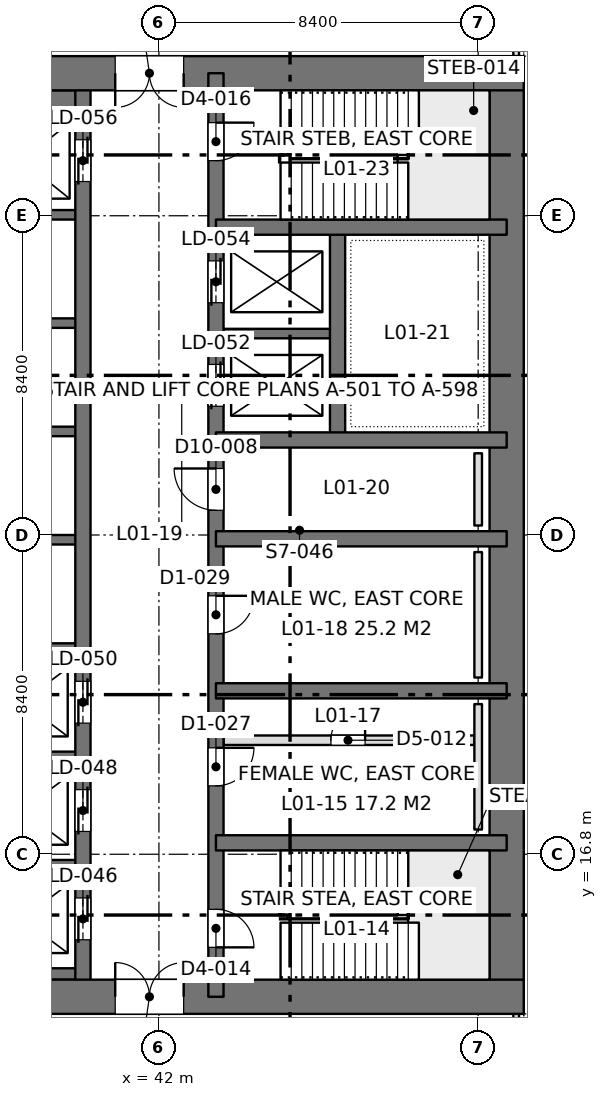
"""IFC4 building model, lengths in metres.
Left out: names, types, materials, properties, quantities, classifications, styles, units other than length and angle.
Written with IfcOpenShell. Run it as: python <this file> out.ifc"""

import sys

from ifc_helpers import new_model, si_unit, direction, frame, frame_2d, origin, place, context, subcontext, project, spatial, rectangle, extrude, element, fill, save


model = new_model("IFC4")
c1 = context("Model", 3, precision=1e-05, world=origin(), true_north=direction((0.0, 1.0)))
c2 = subcontext(c1, "Body", "Model", "MODEL_VIEW")
j1 = project(units=[si_unit("LENGTHUNIT", "METRE"), si_unit("PLANEANGLEUNIT", "RADIAN")], contexts=[c1])
p1 = place(None, origin())
s1 = spatial("IfcSite", under=j1, at=p1, CompositionType="ELEMENT")
p2 = place(p1, origin())
s2 = spatial("IfcBuilding", under=s1, at=p2, CompositionType="ELEMENT")
p3 = place(p2, frame((0.0, 0.0, 5.4)))
s3 = spatial("IfcBuildingStorey", under=s2, at=p3, CompositionType="ELEMENT", Elevation=5.4)
p4 = place(p3, frame((33.6, 13.05, 0.0), z_axis=(0.0, 0.0, 1.0), x_axis=(1.0, 0.0, 0.0)))
e1 = element("IfcWall", 1, at=p4, inside=s3, PredefinedType="SHEAR", context=c2, shape_type="SweptSolid", body=[
    extrude(rectangle(XDim=18.0, YDim=0.9, at=frame_2d((9.0, 0.0))), origin(), (0.0, 0.0, 1.0), 4.5),
])
p5 = place(p4, frame((7.25, 0.0, 0.0)))
e2 = element("IfcOpeningElement", 2, at=p5, cuts=e1, PredefinedType="OPENING", context=c2, shape_type="SweptSolid", body=[
    extrude(rectangle(XDim=1.8, YDim=2.4, at=frame_2d((0.9, 1.2))), frame((0.0, 0.46, 0.0), z_axis=(0.0, -1.0, 0.0), x_axis=(1.0, 0.0, 0.0)), (0.0, 0.0, 1.0), 0.92),
])
p6 = place(p3, frame((33.6, 37.35, 0.0), z_axis=(0.0, 0.0, 1.0), x_axis=(1.0, 0.0, 0.0)))
e3 = element("IfcWall", 3, at=p6, inside=s3, PredefinedType="SHEAR", context=c2, shape_type="SweptSolid", body=[
    extrude(rectangle(XDim=18.0, YDim=0.9, at=frame_2d((9.0, 0.0))), origin(), (0.0, 0.0, 1.0), 4.5),
])
p7 = place(p6, frame((7.25, 0.0, 0.0)))
e4 = element("IfcOpeningElement", 4, at=p7, cuts=e3, PredefinedType="OPENING", context=c2, shape_type="SweptSolid", body=[
    extrude(rectangle(XDim=1.8, YDim=2.4, at=frame_2d((0.9, 1.2))), frame((0.0, 0.46, 0.0), z_axis=(0.0, -1.0, 0.0), x_axis=(1.0, 0.0, 0.0)), (0.0, 0.0, 1.0), 0.92),
])
p8 = place(p3, frame((51.15, 13.05, 0.0), z_axis=(0.0, 0.0, 1.0), x_axis=(0.0, 1.0, 0.0)))
e5 = element("IfcWall", 5, at=p8, inside=s3, PredefinedType="SHEAR", context=c2, shape_type="SweptSolid", body=[
    extrude(rectangle(XDim=24.3, YDim=0.9, at=frame_2d((12.15, 0.0))), origin(), (0.0, 0.0, 1.0), 4.5),
])
p9 = place(p3, frame((43.5, 13.05, 0.0), z_axis=(0.0, 0.0, 1.0), x_axis=(0.0, 1.0, 0.0)))
e6 = element("IfcWall", 6, at=p9, inside=s3, PredefinedType="SHEAR", context=c2, shape_type="SweptSolid", body=[
    extrude(rectangle(XDim=24.3, YDim=0.4, at=frame_2d((12.15, 0.0))), origin(), (0.0, 0.0, 1.0), 4.5),
])
p10 = place(p9, frame((1.3, 0.0, 0.0)))
e7 = element("IfcOpeningElement", 7, at=p10, cuts=e6, PredefinedType="OPENING", context=c2, shape_type="SweptSolid", body=[
    extrude(rectangle(XDim=1.0, YDim=2.2, at=frame_2d((0.5, 1.1))), frame((0.0, 0.21, 0.0), z_axis=(0.0, -1.0, 0.0), x_axis=(1.0, 0.0, 0.0)), (0.0, 0.0, 1.0), 0.42),
])
p11 = place(p9, frame((22.0, 0.0, 0.0)))
e8 = element("IfcOpeningElement", 8, at=p11, cuts=e6, PredefinedType="OPENING", context=c2, shape_type="SweptSolid", body=[
    extrude(rectangle(XDim=1.0, YDim=2.2, at=frame_2d((0.5, 1.1))), frame((0.0, 0.21, 0.0), z_axis=(0.0, -1.0, 0.0), x_axis=(1.0, 0.0, 0.0)), (0.0, 0.0, 1.0), 0.42),
])
p12 = place(p9, frame((5.55, 0.0, 0.0)))
e9 = element("IfcOpeningElement", 9, at=p12, cuts=e6, PredefinedType="OPENING", context=c2, shape_type="SweptSolid", body=[
    extrude(rectangle(XDim=1.0, YDim=2.2, at=frame_2d((0.5, 1.1))), frame((0.0, 0.21, 0.0), z_axis=(0.0, -1.0, 0.0), x_axis=(1.0, 0.0, 0.0)), (0.0, 0.0, 1.0), 0.42),
])
p13 = place(p9, frame((9.55, 0.0, 0.0)))
e10 = element("IfcOpeningElement", 10, at=p13, cuts=e6, PredefinedType="OPENING", context=c2, shape_type="SweptSolid", body=[
    extrude(rectangle(XDim=1.0, YDim=2.2, at=frame_2d((0.5, 1.1))), frame((0.0, 0.21, 0.0), z_axis=(0.0, -1.0, 0.0), x_axis=(1.0, 0.0, 0.0)), (0.0, 0.0, 1.0), 0.42),
])
p14 = place(p9, frame((12.8, 0.0, 0.0)))
e11 = element("IfcOpeningElement", 11, at=p14, cuts=e6, PredefinedType="OPENING", context=c2, shape_type="SweptSolid", body=[
    extrude(rectangle(XDim=1.1, YDim=2.2, at=frame_2d((0.55, 1.1))), frame((0.0, 0.21, 0.0), z_axis=(0.0, -1.0, 0.0), x_axis=(1.0, 0.0, 0.0)), (0.0, 0.0, 1.0), 0.42),
])
p15 = place(p9, frame((15.538, 0.0, 0.0)))
e12 = element("IfcOpeningElement", 12, at=p15, cuts=e6, PredefinedType="OPENING", context=c2, shape_type="SweptSolid", body=[
    extrude(rectangle(XDim=1.1, YDim=2.2, at=frame_2d((0.55, 1.1))), frame((0.0, 0.21, 0.0), z_axis=(0.0, -1.0, 0.0), x_axis=(1.0, 0.0, 0.0)), (0.0, 0.0, 1.0), 0.42),
])
p16 = place(p9, frame((18.262, 0.0, 0.0)))
e13 = element("IfcOpeningElement", 13, at=p16, cuts=e6, PredefinedType="OPENING", context=c2, shape_type="SweptSolid", body=[
    extrude(rectangle(XDim=1.1, YDim=2.2, at=frame_2d((0.55, 1.1))), frame((0.0, 0.21, 0.0), z_axis=(0.0, -1.0, 0.0), x_axis=(1.0, 0.0, 0.0)), (0.0, 0.0, 1.0), 0.42),
])
p17 = place(p3, frame((40.0, 13.05, 0.0), z_axis=(0.0, 0.0, 1.0), x_axis=(0.0, 1.0, 0.0)))
e14 = element("IfcWall", 14, at=p17, inside=s3, PredefinedType="SHEAR", context=c2, shape_type="SweptSolid", body=[
    extrude(rectangle(XDim=24.3, YDim=0.4, at=frame_2d((12.15, 0.0))), origin(), (0.0, 0.0, 1.0), 4.5),
])
p18 = place(p17, frame((1.5, 0.0, 0.0)))
e15 = element("IfcOpeningElement", 15, at=p18, cuts=e14, PredefinedType="OPENING", context=c2, shape_type="SweptSolid", body=[
    extrude(rectangle(XDim=1.1, YDim=2.2, at=frame_2d((0.55, 1.1))), frame((0.0, 0.21, 0.0), z_axis=(0.0, -1.0, 0.0), x_axis=(1.0, 0.0, 0.0)), (0.0, 0.0, 1.0), 0.42),
])
p19 = place(p17, frame((4.35, 0.0, 0.0)))
e16 = element("IfcOpeningElement", 16, at=p19, cuts=e14, PredefinedType="OPENING", context=c2, shape_type="SweptSolid", body=[
    extrude(rectangle(XDim=1.1, YDim=2.2, at=frame_2d((0.55, 1.1))), frame((0.0, 0.21, 0.0), z_axis=(0.0, -1.0, 0.0), x_axis=(1.0, 0.0, 0.0)), (0.0, 0.0, 1.0), 0.42),
])
p20 = place(p17, frame((7.2, 0.0, 0.0)))
e17 = element("IfcOpeningElement", 17, at=p20, cuts=e14, PredefinedType="OPENING", context=c2, shape_type="SweptSolid", body=[
    extrude(rectangle(XDim=1.1, YDim=2.2, at=frame_2d((0.55, 1.1))), frame((0.0, 0.21, 0.0), z_axis=(0.0, -1.0, 0.0), x_axis=(1.0, 0.0, 0.0)), (0.0, 0.0, 1.0), 0.42),
])
p21 = place(p17, frame((21.45, 0.0, 0.0)))
e18 = element("IfcOpeningElement", 18, at=p21, cuts=e14, PredefinedType="OPENING", context=c2, shape_type="SweptSolid", body=[
    extrude(rectangle(XDim=1.1, YDim=2.2, at=frame_2d((0.55, 1.1))), frame((0.0, 0.21, 0.0), z_axis=(0.0, -1.0, 0.0), x_axis=(1.0, 0.0, 0.0)), (0.0, 0.0, 1.0), 0.42),
])
for number, where, z_axis, x_axis in (
    (19, (51.15, 17.1, 0.0), (0.0, 0.0, 1.0), (-1.0, 0.0, 0.0)),
    (20, (51.15, 21.1, 0.0), (0.0, 0.0, 1.0), (-1.0, 0.0, 0.0)),
    (21, (51.15, 25.1, 0.0), (0.0, 0.0, 1.0), (-1.0, 0.0, 0.0)),
    (22, (51.15, 27.7, 0.0), (0.0, 0.0, 1.0), (-1.0, 0.0, 0.0)),
    (23, (51.15, 33.3, 0.0), (0.0, 0.0, 1.0), (-1.0, 0.0, 0.0)),
):
    element("IfcWall", number, at=place(p3, frame(where, z_axis=z_axis, x_axis=x_axis)), inside=s3, PredefinedType="SHEAR", context=c2, shape_type="SweptSolid", body=[
        extrude(rectangle(XDim=7.65, YDim=0.4, at=frame_2d((3.825, 0.0))), origin(), (0.0, 0.0, 1.0), 4.5),
    ])
p22 = place(p3, frame((46.7, 27.7, 0.0), z_axis=(0.0, 0.0, 1.0), x_axis=(0.0, 1.0, 0.0)))
e24 = element("IfcWall", 24, at=p22, inside=s3, PredefinedType="SHEAR", context=c2, shape_type="SweptSolid", body=[
    extrude(rectangle(XDim=5.6, YDim=0.4, at=frame_2d((2.8, 0.0))), origin(), (0.0, 0.0, 1.0), 4.5),
])
p23 = place(p3, frame((46.7, 30.5, 0.0), z_axis=(0.0, 0.0, 1.0), x_axis=(-1.0, 0.0, 0.0)))
e25 = element("IfcWall", 25, at=p23, inside=s3, PredefinedType="SHEAR", context=c2, shape_type="SweptSolid", body=[
    extrude(rectangle(XDim=3.2, YDim=0.25, at=frame_2d((1.6, 0.0))), origin(), (0.0, 0.0, 1.0), 4.5),
])
p24 = place(p3, frame((40.0, 13.65, 0.0), z_axis=(0.0, 0.0, 1.0), x_axis=(-1.0, 0.0, 0.0)))
e26 = element("IfcWall", 26, at=p24, inside=s3, PredefinedType="SHEAR", context=c2, shape_type="SweptSolid", body=[
    extrude(rectangle(XDim=3.2, YDim=0.3, at=frame_2d((1.6, 0.0))), origin(), (0.0, 0.0, 1.0), 4.5),
])
for number, where, z_axis, x_axis in (
    (27, (40.0, 16.525, 0.0), (0.0, 0.0, 1.0), (-1.0, 0.0, 0.0)),
    (28, (40.0, 19.375, 0.0), (0.0, 0.0, 1.0), (-1.0, 0.0, 0.0)),
    (29, (40.0, 22.225, 0.0), (0.0, 0.0, 1.0), (-1.0, 0.0, 0.0)),
    (30, (40.0, 25.075, 0.0), (0.0, 0.0, 1.0), (-1.0, 0.0, 0.0)),
    (31, (40.0, 27.925, 0.0), (0.0, 0.0, 1.0), (-1.0, 0.0, 0.0)),
    (32, (40.0, 30.775, 0.0), (0.0, 0.0, 1.0), (-1.0, 0.0, 0.0)),
    (33, (40.0, 33.625, 0.0), (0.0, 0.0, 1.0), (-1.0, 0.0, 0.0)),
):
    element("IfcWall", number, at=place(p3, frame(where, z_axis=z_axis, x_axis=x_axis)), inside=s3, PredefinedType="SHEAR", context=c2, shape_type="SweptSolid", body=[
        extrude(rectangle(XDim=3.2, YDim=0.25, at=frame_2d((1.6, 0.0))), origin(), (0.0, 0.0, 1.0), 4.5),
    ])
p25 = place(p3, frame((40.0, 36.625, 0.0), z_axis=(0.0, 0.0, 1.0), x_axis=(-1.0, 0.0, 0.0)))
e34 = element("IfcWall", 34, at=p25, inside=s3, PredefinedType="SHEAR", context=c2, shape_type="SweptSolid", body=[
    extrude(rectangle(XDim=3.2, YDim=0.55, at=frame_2d((1.6, 0.0))), origin(), (0.0, 0.0, 1.0), 4.5),
])
p26 = place(p3, frame((51.4, 6.12, 0.0), z_axis=(0.0, 0.0, 1.0), x_axis=(0.0, 1.0, 0.0)))
e35 = element("IfcWall", 35, at=p26, inside=s3, PredefinedType="PARTITIONING", context=c2, shape_type="SweptSolid", body=[
    extrude(rectangle(XDim=6.482, YDim=0.15, at=frame_2d((3.241, 0.0))), origin(), (0.0, 0.0, 1.0), 3.7),
])
p27 = place(p26, frame((3.88, 0.0, 0.0)))
e36 = element("IfcOpeningElement", 36, at=p27, cuts=e35, PredefinedType="OPENING", context=c2, shape_type="SweptSolid", body=[
    extrude(rectangle(XDim=1.0, YDim=2.2, at=frame_2d((0.5, 1.1))), frame((0.0, 0.085, 0.0), z_axis=(0.0, -1.0, 0.0), x_axis=(1.0, 0.0, 0.0)), (0.0, 0.0, 1.0), 0.17),
])
p28 = place(p3, frame((51.4, 37.8, 0.0), z_axis=(0.0, 0.0, 1.0), x_axis=(0.0, 1.0, 0.0)))
e37 = element("IfcWall", 37, at=p28, inside=s3, PredefinedType="PARTITIONING", context=c2, shape_type="SweptSolid", body=[
    extrude(rectangle(XDim=13.6, YDim=0.15, at=frame_2d((6.8, 0.0))), origin(), (0.0, 0.0, 1.0), 3.7),
])
p29 = place(p28, frame((7.9, 0.0, 0.0)))
e38 = element("IfcOpeningElement", 38, at=p29, cuts=e37, PredefinedType="OPENING", context=c2, shape_type="SweptSolid", body=[
    extrude(rectangle(XDim=1.0, YDim=2.2, at=frame_2d((0.5, 1.1))), frame((0.0, 0.085, 0.0), z_axis=(0.0, -1.0, 0.0), x_axis=(1.0, 0.0, 0.0)), (0.0, 0.0, 1.0), 0.17),
])
p30 = place(p3, frame((43.7, 19.8, 0.0), z_axis=(0.0, 0.0, 1.0), x_axis=(1.0, 0.0, 0.0)))
e39 = element("IfcWall", 39, at=p30, inside=s3, PredefinedType="PARTITIONING", context=c2, shape_type="SweptSolid", body=[
    extrude(rectangle(XDim=6.6, YDim=0.25, at=frame_2d((3.3, 0.0))), origin(), (0.0, 0.0, 1.0), 4.3),
])
p31 = place(p30, frame((2.825, 0.0, 0.0)))
e40 = element("IfcOpeningElement", 40, at=p31, cuts=e39, PredefinedType="OPENING", context=c2, shape_type="SweptSolid", body=[
    extrude(rectangle(XDim=0.9, YDim=2.2, at=frame_2d((0.45, 1.1))), frame((0.0, 0.135, 0.0), z_axis=(0.0, -1.0, 0.0), x_axis=(1.0, 0.0, 0.0)), (0.0, 0.0, 1.0), 0.27),
])
for number, where, z_axis, x_axis in (
    (41, (50.4, 17.45, 0.0), (0.0, 0.0, 1.0), (0.0, 1.0, 0.0)),
    (42, (50.4, 21.45, 0.0), (0.0, 0.0, 1.0), (0.0, 1.0, 0.0)),
):
    element("IfcWall", number, at=place(p3, frame(where, z_axis=z_axis, x_axis=x_axis)), inside=s3, PredefinedType="PLUMBINGWALL", context=c2, shape_type="SweptSolid", body=[
        extrude(rectangle(XDim=3.3, YDim=0.2, at=frame_2d((1.65, 0.0))), origin(), (0.0, 0.0, 1.0), 1.2),
    ])
p32 = place(p3, frame((50.4, 25.45, 0.0), z_axis=(0.0, 0.0, 1.0), x_axis=(0.0, 1.0, 0.0)))
e43 = element("IfcWall", 43, at=p32, inside=s3, PredefinedType="PLUMBINGWALL", context=c2, shape_type="SweptSolid", body=[
    extrude(rectangle(XDim=1.9, YDim=0.2, at=frame_2d((0.95, 0.0))), origin(), (0.0, 0.0, 1.0), 1.2),
])
p33 = place(p5, origin())
e44 = element("IfcDoor", 44, at=p33, inside=s3, OperationType="DOUBLE_DOOR_SINGLE_SWING", PredefinedType="DOOR", context=c2, shape_type="SweptSolid", body=[
    extrude(rectangle(XDim=1.8, YDim=2.4, at=frame_2d((0.9, 1.2))), frame((0.0, 0.025, 0.0), z_axis=(0.0, -1.0, 0.0), x_axis=(1.0, 0.0, 0.0)), (0.0, 0.0, 1.0), 0.05),
])
fill(e2, e44)
p34 = place(p7, frame((1.8, 0.0, 0.0), z_axis=(0.0, 0.0, 1.0), x_axis=(-1.0, 0.0, 0.0)))
e45 = element("IfcDoor", 45, at=p34, inside=s3, OperationType="DOUBLE_DOOR_SINGLE_SWING", PredefinedType="DOOR", context=c2, shape_type="SweptSolid", body=[
    extrude(rectangle(XDim=1.8, YDim=2.4, at=frame_2d((0.9, 1.2))), frame((0.0, 0.025, 0.0), z_axis=(0.0, -1.0, 0.0), x_axis=(1.0, 0.0, 0.0)), (0.0, 0.0, 1.0), 0.05),
])
fill(e4, e45)
p35 = place(p10, frame((1.0, 0.0, 0.0), z_axis=(0.0, 0.0, 1.0), x_axis=(-1.0, 0.0, 0.0)))
e46 = element("IfcDoor", 46, at=p35, inside=s3, OperationType="SINGLE_SWING_RIGHT", PredefinedType="DOOR", context=c2, shape_type="SweptSolid", body=[
    extrude(rectangle(XDim=1.0, YDim=2.2, at=frame_2d((0.5, 1.1))), frame((0.0, 0.025, 0.0), z_axis=(0.0, -1.0, 0.0), x_axis=(1.0, 0.0, 0.0)), (0.0, 0.0, 1.0), 0.05),
])
fill(e7, e46)
p36 = place(p11, frame((1.0, 0.0, 0.0), z_axis=(0.0, 0.0, 1.0), x_axis=(-1.0, 0.0, 0.0)))
e47 = element("IfcDoor", 47, at=p36, inside=s3, OperationType="SINGLE_SWING_LEFT", PredefinedType="DOOR", context=c2, shape_type="SweptSolid", body=[
    extrude(rectangle(XDim=1.0, YDim=2.2, at=frame_2d((0.5, 1.1))), frame((0.0, 0.025, 0.0), z_axis=(0.0, -1.0, 0.0), x_axis=(1.0, 0.0, 0.0)), (0.0, 0.0, 1.0), 0.05),
])
fill(e8, e47)
p37 = place(p12, frame((1.0, 0.0, 0.0), z_axis=(0.0, 0.0, 1.0), x_axis=(-1.0, 0.0, 0.0)))
e48 = element("IfcDoor", 48, at=p37, inside=s3, OperationType="SINGLE_SWING_LEFT", PredefinedType="DOOR", context=c2, shape_type="SweptSolid", body=[
    extrude(rectangle(XDim=1.0, YDim=2.2, at=frame_2d((0.5, 1.1))), frame((0.0, 0.025, 0.0), z_axis=(0.0, -1.0, 0.0), x_axis=(1.0, 0.0, 0.0)), (0.0, 0.0, 1.0), 0.05),
])
fill(e9, e48)
p38 = place(p13, frame((1.0, 0.0, 0.0), z_axis=(0.0, 0.0, 1.0), x_axis=(-1.0, 0.0, 0.0)))
e49 = element("IfcDoor", 49, at=p38, inside=s3, OperationType="SINGLE_SWING_LEFT", PredefinedType="DOOR", context=c2, shape_type="SweptSolid", body=[
    extrude(rectangle(XDim=1.0, YDim=2.2, at=frame_2d((0.5, 1.1))), frame((0.0, 0.025, 0.0), z_axis=(0.0, -1.0, 0.0), x_axis=(1.0, 0.0, 0.0)), (0.0, 0.0, 1.0), 0.05),
])
fill(e10, e49)
p39 = place(p14, origin())
e50 = element("IfcDoor", 50, at=p39, inside=s3, OperationType="SINGLE_SWING_RIGHT", PredefinedType="DOOR", context=c2, shape_type="SweptSolid", body=[
    extrude(rectangle(XDim=1.1, YDim=2.2, at=frame_2d((0.55, 1.1))), frame((0.0, 0.025, 0.0), z_axis=(0.0, -1.0, 0.0), x_axis=(1.0, 0.0, 0.0)), (0.0, 0.0, 1.0), 0.05),
])
fill(e11, e50)
p40 = place(p18, origin())
e51 = element("IfcDoor", 51, at=p40, inside=s3, OperationType="DOUBLE_DOOR_SLIDING", PredefinedType="DOOR", context=c2, shape_type="SweptSolid", body=[
    extrude(rectangle(XDim=1.1, YDim=2.2, at=frame_2d((0.55, 1.1))), frame((0.0, 0.025, 0.0), z_axis=(0.0, -1.0, 0.0), x_axis=(1.0, 0.0, 0.0)), (0.0, 0.0, 1.0), 0.05),
])
fill(e15, e51)
p41 = place(p19, origin())
e52 = element("IfcDoor", 52, at=p41, inside=s3, OperationType="DOUBLE_DOOR_SLIDING", PredefinedType="DOOR", context=c2, shape_type="SweptSolid", body=[
    extrude(rectangle(XDim=1.1, YDim=2.2, at=frame_2d((0.55, 1.1))), frame((0.0, 0.025, 0.0), z_axis=(0.0, -1.0, 0.0), x_axis=(1.0, 0.0, 0.0)), (0.0, 0.0, 1.0), 0.05),
])
fill(e16, e52)
p42 = place(p20, origin())
e53 = element("IfcDoor", 53, at=p42, inside=s3, OperationType="DOUBLE_DOOR_SLIDING", PredefinedType="DOOR", context=c2, shape_type="SweptSolid", body=[
    extrude(rectangle(XDim=1.1, YDim=2.2, at=frame_2d((0.55, 1.1))), frame((0.0, 0.025, 0.0), z_axis=(0.0, -1.0, 0.0), x_axis=(1.0, 0.0, 0.0)), (0.0, 0.0, 1.0), 0.05),
])
fill(e17, e53)
p43 = place(p21, origin())
e54 = element("IfcDoor", 54, at=p43, inside=s3, OperationType="DOUBLE_DOOR_SLIDING", PredefinedType="DOOR", context=c2, shape_type="SweptSolid", body=[
    extrude(rectangle(XDim=1.1, YDim=2.2, at=frame_2d((0.55, 1.1))), frame((0.0, 0.025, 0.0), z_axis=(0.0, -1.0, 0.0), x_axis=(1.0, 0.0, 0.0)), (0.0, 0.0, 1.0), 0.05),
])
fill(e18, e54)
p44 = place(p15, origin())
e55 = element("IfcDoor", 55, at=p44, inside=s3, OperationType="DOUBLE_DOOR_SLIDING", PredefinedType="DOOR", context=c2, shape_type="SweptSolid", body=[
    extrude(rectangle(XDim=1.1, YDim=2.2, at=frame_2d((0.55, 1.1))), frame((0.0, 0.025, 0.0), z_axis=(0.0, -1.0, 0.0), x_axis=(1.0, 0.0, 0.0)), (0.0, 0.0, 1.0), 0.05),
])
fill(e12, e55)
p45 = place(p16, origin())
e56 = element("IfcDoor", 56, at=p45, inside=s3, OperationType="DOUBLE_DOOR_SLIDING", PredefinedType="DOOR", context=c2, shape_type="SweptSolid", body=[
    extrude(rectangle(XDim=1.1, YDim=2.2, at=frame_2d((0.55, 1.1))), frame((0.0, 0.025, 0.0), z_axis=(0.0, -1.0, 0.0), x_axis=(1.0, 0.0, 0.0)), (0.0, 0.0, 1.0), 0.05),
])
fill(e13, e56)
p46 = place(p31, origin())
e57 = element("IfcDoor", 57, at=p46, inside=s3, OperationType="SINGLE_SWING_RIGHT", PredefinedType="DOOR", context=c2, shape_type="SweptSolid", body=[
    extrude(rectangle(XDim=0.9, YDim=2.2, at=frame_2d((0.45, 1.1))), frame((0.0, 0.025, 0.0), z_axis=(0.0, -1.0, 0.0), x_axis=(1.0, 0.0, 0.0)), (0.0, 0.0, 1.0), 0.05),
])
fill(e40, e57)
save(model, sys.argv[1])
